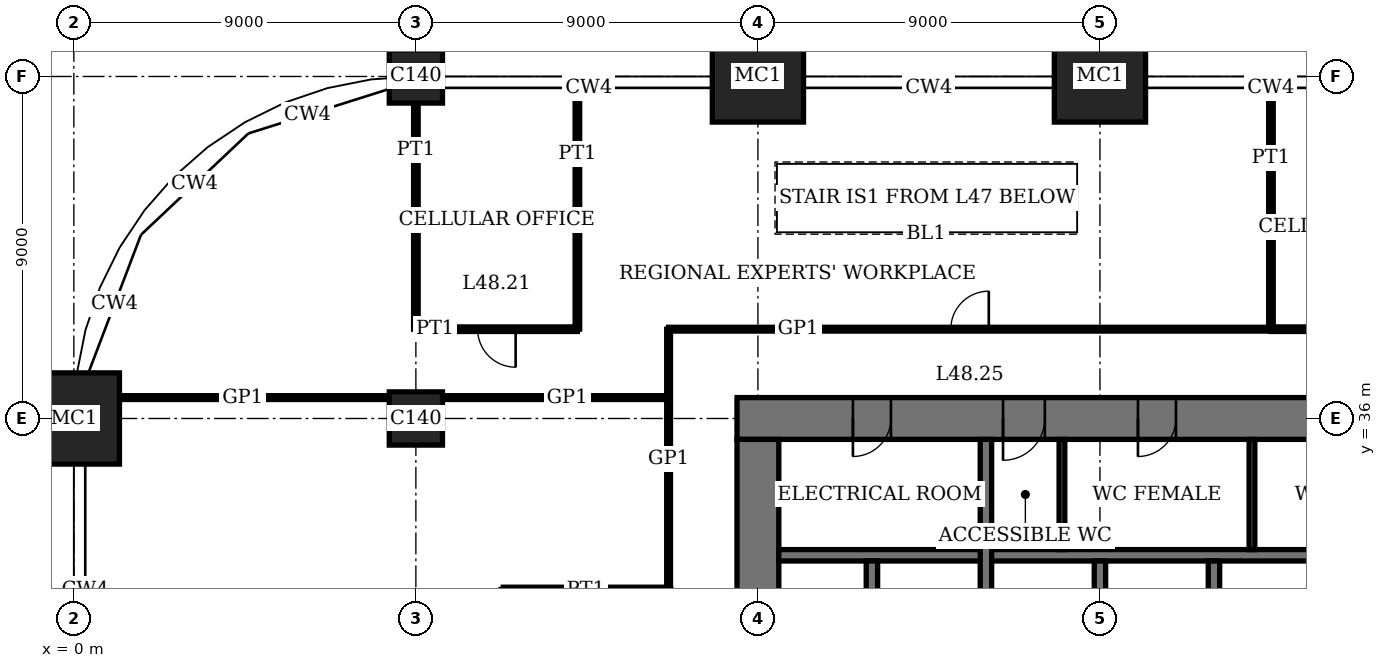
"""IFC4 building model, lengths in metres.
Left out: names, types, materials, properties, quantities, classifications, styles, units other than length and angle.
Written with IfcOpenShell. Run it as: python <this file> out.ifc"""

import sys

from ifc_helpers import new_model, si_unit, direction, frame, frame_2d, origin, origin_2d, place, context, subcontext, project, spatial, rectangle, extrude, element, fill, save


model = new_model("IFC4")
c1 = context("Model", 3, precision=1e-05, world=origin(), true_north=direction((0.0, 1.0)))
c2 = subcontext(c1, "Body", "Model", "MODEL_VIEW")
j1 = project(units=[si_unit("LENGTHUNIT", "METRE"), si_unit("PLANEANGLEUNIT", "RADIAN")], contexts=[c1])
p1 = place(None, origin())
s1 = spatial("IfcSite", under=j1, at=p1, CompositionType="ELEMENT")
p2 = place(p1, origin())
s2 = spatial("IfcBuilding", under=s1, at=p2, CompositionType="ELEMENT")
p3 = place(p2, frame((0.0, 0.0, 198.2)))
s3 = spatial("IfcBuildingStorey", under=s2, at=p3, CompositionType="ELEMENT", Elevation=198.2)
p4 = place(p3, frame((0.0, 36.0, 0.0), z_axis=(0.0, 0.0, 1.0), x_axis=(1.0, 0.0, 0.0)))
e1 = element("IfcColumn", 1, at=p4, inside=s3, PredefinedType="COLUMN", context=c2, shape_type="SweptSolid", body=[
    extrude(rectangle(XDim=2.4, YDim=2.4, at=origin_2d()), origin(), (0.0, 0.0, 1.0), 4.0),
])
for number, where, z_axis, x_axis in (
    (2, (9.0, 36.0, 0.0), (0.0, 0.0, 1.0), (1.0, 0.0, 0.0)),
    (3, (9.0, 45.0, 0.0), (0.0, 0.0, 1.0), (1.0, 0.0, 0.0)),
):
    element("IfcColumn", number, at=place(p3, frame(where, z_axis=z_axis, x_axis=x_axis)), inside=s3, PredefinedType="COLUMN", context=c2, shape_type="SweptSolid", body=[
        extrude(rectangle(XDim=1.4, YDim=1.4, at=origin_2d()), origin(), (0.0, 0.0, 1.0), 4.0),
    ])
for number, where, z_axis, x_axis in (
    (4, (18.0, 45.0, 0.0), (0.0, 0.0, 1.0), (1.0, 0.0, 0.0)),
    (5, (27.0, 45.0, 0.0), (0.0, 0.0, 1.0), (1.0, 0.0, 0.0)),
):
    element("IfcColumn", number, at=place(p3, frame(where, z_axis=z_axis, x_axis=x_axis)), inside=s3, PredefinedType="COLUMN", context=c2, shape_type="SweptSolid", body=[
        extrude(rectangle(XDim=2.4, YDim=2.4, at=origin_2d()), origin(), (0.0, 0.0, 1.0), 4.0),
    ])
p5 = place(p3, frame((45.55, 36.0, 0.0), z_axis=(0.0, 0.0, 1.0), x_axis=(-1.0, 0.0, 0.0)))
e6 = element("IfcWall", 6, at=p5, inside=s3, PredefinedType="SHEAR", context=c2, shape_type="SweptSolid", body=[
    extrude(rectangle(XDim=28.1, YDim=1.1, at=frame_2d((14.05, 0.0))), origin(), (0.0, 0.0, 1.0), 4.0),
])
p6 = place(p5, frame((11.55, 0.0, 0.0)))
e7 = element("IfcOpeningElement", 7, at=p6, cuts=e6, PredefinedType="OPENING", context=c2, shape_type="SweptSolid", body=[
    extrude(rectangle(XDim=1.0, YDim=2.4, at=frame_2d((0.5, 1.2))), frame((0.0, 0.56, 0.0), z_axis=(0.0, -1.0, 0.0), x_axis=(1.0, 0.0, 0.0)), (0.0, 0.0, 1.0), 1.12),
])
p7 = place(p5, frame((16.55, 0.0, 0.0)))
e8 = element("IfcOpeningElement", 8, at=p7, cuts=e6, PredefinedType="OPENING", context=c2, shape_type="SweptSolid", body=[
    extrude(rectangle(XDim=1.0, YDim=2.4, at=frame_2d((0.5, 1.2))), frame((0.0, 0.56, 0.0), z_axis=(0.0, -1.0, 0.0), x_axis=(1.0, 0.0, 0.0)), (0.0, 0.0, 1.0), 1.12),
])
p8 = place(p5, frame((20.0, 0.0, 0.0)))
e9 = element("IfcOpeningElement", 9, at=p8, cuts=e6, PredefinedType="OPENING", context=c2, shape_type="SweptSolid", body=[
    extrude(rectangle(XDim=1.1, YDim=2.4, at=frame_2d((0.55, 1.2))), frame((0.0, 0.56, 0.0), z_axis=(0.0, -1.0, 0.0), x_axis=(1.0, 0.0, 0.0)), (0.0, 0.0, 1.0), 1.12),
])
p9 = place(p5, frame((24.05, 0.0, 0.0)))
e10 = element("IfcOpeningElement", 10, at=p9, cuts=e6, PredefinedType="OPENING", context=c2, shape_type="SweptSolid", body=[
    extrude(rectangle(XDim=1.0, YDim=2.4, at=frame_2d((0.5, 1.2))), frame((0.0, 0.56, 0.0), z_axis=(0.0, -1.0, 0.0), x_axis=(1.0, 0.0, 0.0)), (0.0, 0.0, 1.0), 1.12),
])
p10 = place(p3, frame((18.0, 35.45, 0.0), z_axis=(0.0, 0.0, 1.0), x_axis=(0.0, -1.0, 0.0)))
e11 = element("IfcWall", 11, at=p10, inside=s3, PredefinedType="SHEAR", context=c2, shape_type="SweptSolid", body=[
    extrude(rectangle(XDim=16.9, YDim=1.1, at=frame_2d((8.45, 0.0))), origin(), (0.0, 0.0, 1.0), 4.0),
])
p11 = place(p10, frame((8.45, 0.0, 0.0)))
e12 = element("IfcOpeningElement", 12, at=p11, cuts=e11, PredefinedType="OPENING", context=c2, shape_type="SweptSolid", body=[
    extrude(rectangle(XDim=1.8, YDim=2.4, at=frame_2d((0.9, 1.2))), frame((0.0, 0.56, 0.0), z_axis=(0.0, -1.0, 0.0), x_axis=(1.0, 0.0, 0.0)), (0.0, 0.0, 1.0), 1.12),
])
p12 = place(p3, frame((18.55, 32.4, 0.0), z_axis=(0.0, 0.0, 1.0), x_axis=(1.0, 0.0, 0.0)))
e13 = element("IfcWall", 13, at=p12, inside=s3, PredefinedType="SHEAR", context=c2, shape_type="SweptSolid", body=[
    extrude(rectangle(XDim=17.3, YDim=0.3, at=frame_2d((8.65, 0.0))), origin(), (0.0, 0.0, 1.0), 4.0),
])
for number, where, z_axis, x_axis in (
    (14, (30.0, 29.55, 0.0), (0.0, 0.0, 1.0), (0.0, 1.0, 0.0)),
    (15, (27.0, 29.55, 0.0), (0.0, 0.0, 1.0), (0.0, 1.0, 0.0)),
):
    element("IfcWall", number, at=place(p3, frame(where, z_axis=z_axis, x_axis=x_axis)), inside=s3, PredefinedType="SHEAR", context=c2, shape_type="SweptSolid", body=[
        extrude(rectangle(XDim=2.7, YDim=0.3, at=frame_2d((1.35, 0.0))), origin(), (0.0, 0.0, 1.0), 4.0),
    ])
p13 = place(p3, frame((24.0, 29.55, 0.0), z_axis=(0.0, 0.0, 1.0), x_axis=(0.0, 1.0, 0.0)))
e16 = element("IfcWall", 16, at=p13, inside=s3, PredefinedType="SHEAR", context=c2, shape_type="SweptSolid", body=[
    extrude(rectangle(XDim=5.9, YDim=0.3, at=frame_2d((2.95, 0.0))), origin(), (0.0, 0.0, 1.0), 4.0),
])
p14 = place(p3, frame((21.0, 29.55, 0.0), z_axis=(0.0, 0.0, 1.0), x_axis=(0.0, 1.0, 0.0)))
e17 = element("IfcWall", 17, at=p14, inside=s3, PredefinedType="SHEAR", context=c2, shape_type="SweptSolid", body=[
    extrude(rectangle(XDim=2.7, YDim=0.3, at=frame_2d((1.35, 0.0))), origin(), (0.0, 0.0, 1.0), 4.0),
])
p15 = place(p3, frame((11.3, 31.5, 0.0), z_axis=(0.0, 0.0, 1.0), x_axis=(1.0, 0.0, 0.0)))
e18 = element("IfcWall", 18, at=p15, inside=s3, PredefinedType="PARTITIONING", context=c2, shape_type="SweptSolid", body=[
    extrude(rectangle(XDim=4.35, YDim=0.12, at=frame_2d((2.175, 0.0))), origin(), (0.0, 0.0, 1.0), 3.1),
])
p16 = place(p3, frame((1.2, 36.55, 0.0), z_axis=(0.0, 0.0, 1.0), x_axis=(1.0, 0.0, 0.0)))
e19 = element("IfcWall", 19, at=p16, inside=s3, PredefinedType="PARTITIONING", context=c2, shape_type="SweptSolid", body=[
    extrude(rectangle(XDim=7.1, YDim=0.1, at=frame_2d((3.55, 0.0))), origin(), (0.0, 0.0, 1.0), 3.75),
])
p17 = place(p3, frame((9.7, 36.55, 0.0), z_axis=(0.0, 0.0, 1.0), x_axis=(1.0, 0.0, 0.0)))
e20 = element("IfcWall", 20, at=p17, inside=s3, PredefinedType="PARTITIONING", context=c2, shape_type="SweptSolid", body=[
    extrude(rectangle(XDim=5.95, YDim=0.1, at=frame_2d((2.975, 0.0))), origin(), (0.0, 0.0, 1.0), 3.75),
])
p18 = place(p3, frame((9.0, 38.35, 0.0), z_axis=(0.0, 0.0, 1.0), x_axis=(1.0, 0.0, 0.0)))
e21 = element("IfcWall", 21, at=p18, inside=s3, PredefinedType="PARTITIONING", context=c2, shape_type="SweptSolid", body=[
    extrude(rectangle(XDim=4.25, YDim=0.12, at=frame_2d((2.125, 0.0))), origin(), (0.0, 0.0, 1.0), 3.75),
])
p19 = place(p18, frame((1.625, 0.0, 0.0)))
e22 = element("IfcOpeningElement", 22, at=p19, cuts=e21, PredefinedType="OPENING", context=c2, shape_type="SweptSolid", body=[
    extrude(rectangle(XDim=1.0, YDim=2.4, at=frame_2d((0.5, 1.2))), frame((0.0, 0.07, 0.0), z_axis=(0.0, -1.0, 0.0), x_axis=(1.0, 0.0, 0.0)), (0.0, 0.0, 1.0), 0.14),
])
p20 = place(p3, frame((31.5, 38.35, 0.0), z_axis=(0.0, 0.0, 1.0), x_axis=(1.0, 0.0, 0.0)))
e23 = element("IfcWall", 23, at=p20, inside=s3, PredefinedType="PARTITIONING", context=c2, shape_type="SweptSolid", body=[
    extrude(rectangle(XDim=4.5, YDim=0.12, at=frame_2d((2.25, 0.0))), origin(), (0.0, 0.0, 1.0), 3.75),
])
p21 = place(p20, frame((1.75, 0.0, 0.0)))
e24 = element("IfcOpeningElement", 24, at=p21, cuts=e23, PredefinedType="OPENING", context=c2, shape_type="SweptSolid", body=[
    extrude(rectangle(XDim=1.0, YDim=2.4, at=frame_2d((0.5, 1.2))), frame((0.0, 0.07, 0.0), z_axis=(0.0, -1.0, 0.0), x_axis=(1.0, 0.0, 0.0)), (0.0, 0.0, 1.0), 0.14),
])
p22 = place(p3, frame((15.65, 38.35, 0.0), z_axis=(0.0, 0.0, 1.0), x_axis=(1.0, 0.0, 0.0)))
e25 = element("IfcWall", 25, at=p22, inside=s3, PredefinedType="PARTITIONING", context=c2, shape_type="SweptSolid", body=[
    extrude(rectangle(XDim=15.85, YDim=0.1, at=frame_2d((7.925, 0.0))), origin(), (0.0, 0.0, 1.0), 3.75),
])
p23 = place(p22, frame((7.425, 0.0, 0.0)))
e26 = element("IfcOpeningElement", 26, at=p23, cuts=e25, PredefinedType="OPENING", context=c2, shape_type="SweptSolid", body=[
    extrude(rectangle(XDim=1.0, YDim=2.4, at=frame_2d((0.5, 1.2))), frame((0.0, 0.06, 0.0), z_axis=(0.0, -1.0, 0.0), x_axis=(1.0, 0.0, 0.0)), (0.0, 0.0, 1.0), 0.12),
])
p24 = place(p3, frame((9.0, 38.35, 0.0), z_axis=(0.0, 0.0, 1.0), x_axis=(0.0, 1.0, 0.0)))
e27 = element("IfcWall", 27, at=p24, inside=s3, PredefinedType="PARTITIONING", context=c2, shape_type="SweptSolid", body=[
    extrude(rectangle(XDim=5.95, YDim=0.12, at=frame_2d((2.975, 0.0))), origin(), (0.0, 0.0, 1.0), 3.05),
])
p25 = place(p3, frame((13.25, 38.35, 0.0), z_axis=(0.0, 0.0, 1.0), x_axis=(0.0, 1.0, 0.0)))
e28 = element("IfcWall", 28, at=p25, inside=s3, PredefinedType="PARTITIONING", context=c2, shape_type="SweptSolid", body=[
    extrude(rectangle(XDim=6.34, YDim=0.12, at=frame_2d((3.17, 0.0))), origin(), (0.0, 0.0, 1.0), 3.75),
])
p26 = place(p3, frame((15.65, 31.5, 0.0), z_axis=(0.0, 0.0, 1.0), x_axis=(0.0, 1.0, 0.0)))
e29 = element("IfcWall", 29, at=p26, inside=s3, PredefinedType="PARTITIONING", context=c2, shape_type="SweptSolid", body=[
    extrude(rectangle(XDim=6.85, YDim=0.1, at=frame_2d((3.425, 0.0))), origin(), (0.0, 0.0, 1.0), 3.75),
])
p27 = place(p3, frame((31.5, 38.35, 0.0), z_axis=(0.0, 0.0, 1.0), x_axis=(0.0, 1.0, 0.0)))
e30 = element("IfcWall", 30, at=p27, inside=s3, PredefinedType="PARTITIONING", context=c2, shape_type="SweptSolid", body=[
    extrude(rectangle(XDim=6.34, YDim=0.12, at=frame_2d((3.17, 0.0))), origin(), (0.0, 0.0, 1.0), 3.75),
])
for number, where, z_axis, x_axis in (
    (31, (31.0, 32.55, 0.0), (0.0, 0.0, 1.0), (0.0, 1.0, 0.0)),
    (32, (26.0, 32.55, 0.0), (0.0, 0.0, 1.0), (0.0, 1.0, 0.0)),
):
    element("IfcWall", number, at=place(p3, frame(where, z_axis=z_axis, x_axis=x_axis)), inside=s3, PredefinedType="PARTITIONING", context=c2, shape_type="SweptSolid", body=[
        extrude(rectangle(XDim=2.9, YDim=0.15, at=frame_2d((1.45, 0.0))), origin(), (0.0, 0.0, 1.0), 3.75),
    ])
p28 = place(p7, origin())
e33 = element("IfcDoor", 33, at=p28, inside=s3, OperationType="SINGLE_SWING_LEFT", PredefinedType="DOOR", context=c2, shape_type="SweptSolid", body=[
    extrude(rectangle(XDim=1.0, YDim=2.4, at=frame_2d((0.5, 1.2))), frame((0.0, 0.025, 0.0), z_axis=(0.0, -1.0, 0.0), x_axis=(1.0, 0.0, 0.0)), (0.0, 0.0, 1.0), 0.05),
    extrude(rectangle(XDim=0.04, YDim=2.4, at=frame_2d((0.02, 1.2))), frame((0.0, 0.4, 0.0), z_axis=(0.0, -1.0, 0.0), x_axis=(1.0, 0.0, 0.0)), (0.0, 0.0, 1.0), 0.8),
    extrude(rectangle(XDim=0.04, YDim=2.4, at=frame_2d((0.98, 1.2))), frame((0.0, 0.4, 0.0), z_axis=(0.0, -1.0, 0.0), x_axis=(1.0, 0.0, 0.0)), (0.0, 0.0, 1.0), 0.8),
    extrude(rectangle(XDim=1.0, YDim=0.04, at=frame_2d((0.5, 2.38))), frame((0.0, 0.4, 0.0), z_axis=(0.0, -1.0, 0.0), x_axis=(1.0, 0.0, 0.0)), (0.0, 0.0, 1.0), 0.8),
])
fill(e8, e33)
p29 = place(p8, origin())
e34 = element("IfcDoor", 34, at=p29, inside=s3, OperationType="SINGLE_SWING_LEFT", PredefinedType="DOOR", context=c2, shape_type="SweptSolid", body=[
    extrude(rectangle(XDim=1.1, YDim=2.4, at=frame_2d((0.55, 1.2))), frame((0.0, 0.025, 0.0), z_axis=(0.0, -1.0, 0.0), x_axis=(1.0, 0.0, 0.0)), (0.0, 0.0, 1.0), 0.05),
    extrude(rectangle(XDim=0.04, YDim=2.4, at=frame_2d((0.02, 1.2))), frame((0.0, 0.44, 0.0), z_axis=(0.0, -1.0, 0.0), x_axis=(1.0, 0.0, 0.0)), (0.0, 0.0, 1.0), 0.88),
    extrude(rectangle(XDim=0.04, YDim=2.4, at=frame_2d((1.08, 1.2))), frame((0.0, 0.44, 0.0), z_axis=(0.0, -1.0, 0.0), x_axis=(1.0, 0.0, 0.0)), (0.0, 0.0, 1.0), 0.88),
    extrude(rectangle(XDim=1.1, YDim=0.04, at=frame_2d((0.55, 2.38))), frame((0.0, 0.44, 0.0), z_axis=(0.0, -1.0, 0.0), x_axis=(1.0, 0.0, 0.0)), (0.0, 0.0, 1.0), 0.88),
])
fill(e9, e34)
p30 = place(p9, origin())
e35 = element("IfcDoor", 35, at=p30, inside=s3, OperationType="SINGLE_SWING_LEFT", PredefinedType="DOOR", context=c2, shape_type="SweptSolid", body=[
    extrude(rectangle(XDim=1.0, YDim=2.4, at=frame_2d((0.5, 1.2))), frame((0.0, 0.025, 0.0), z_axis=(0.0, -1.0, 0.0), x_axis=(1.0, 0.0, 0.0)), (0.0, 0.0, 1.0), 0.05),
    extrude(rectangle(XDim=0.04, YDim=2.4, at=frame_2d((0.02, 1.2))), frame((0.0, 0.4, 0.0), z_axis=(0.0, -1.0, 0.0), x_axis=(1.0, 0.0, 0.0)), (0.0, 0.0, 1.0), 0.8),
    extrude(rectangle(XDim=0.04, YDim=2.4, at=frame_2d((0.98, 1.2))), frame((0.0, 0.4, 0.0), z_axis=(0.0, -1.0, 0.0), x_axis=(1.0, 0.0, 0.0)), (0.0, 0.0, 1.0), 0.8),
    extrude(rectangle(XDim=1.0, YDim=0.04, at=frame_2d((0.5, 2.38))), frame((0.0, 0.4, 0.0), z_axis=(0.0, -1.0, 0.0), x_axis=(1.0, 0.0, 0.0)), (0.0, 0.0, 1.0), 0.8),
])
fill(e10, e35)
p31 = place(p19, origin())
e36 = element("IfcDoor", 36, at=p31, inside=s3, OperationType="SINGLE_SWING_RIGHT", PredefinedType="DOOR", context=c2, shape_type="SweptSolid", body=[
    extrude(rectangle(XDim=1.0, YDim=2.4, at=frame_2d((0.5, 1.2))), frame((0.0, 0.025, 0.0), z_axis=(0.0, -1.0, 0.0), x_axis=(1.0, 0.0, 0.0)), (0.0, 0.0, 1.0), 0.05),
])
fill(e22, e36)
p32 = place(p23, origin())
e37 = element("IfcDoor", 37, at=p32, inside=s3, OperationType="SINGLE_SWING_LEFT", PredefinedType="DOOR", context=c2, shape_type="SweptSolid", body=[
    extrude(rectangle(XDim=1.0, YDim=2.4, at=frame_2d((0.5, 1.2))), frame((0.0, 0.02, 0.0), z_axis=(0.0, -1.0, 0.0), x_axis=(1.0, 0.0, 0.0)), (0.0, 0.0, 1.0), 0.04),
])
fill(e26, e37)
save(model, sys.argv[1])
